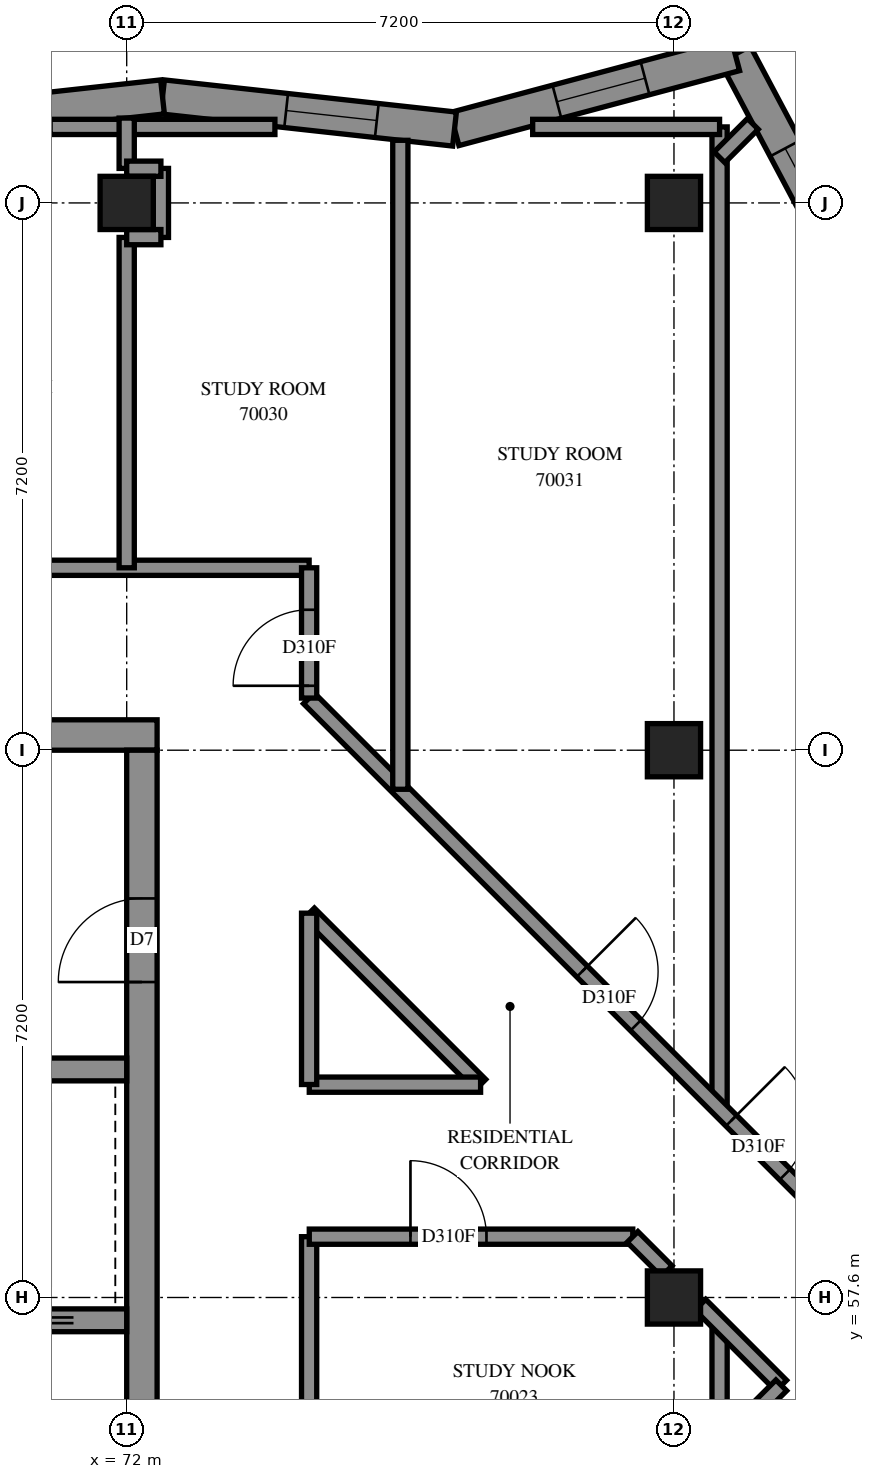
"""IFC4 building model, lengths in metres.
Left out: names, types, materials, properties, quantities, classifications, styles, units other than length and angle.
Written with IfcOpenShell. Run it as: python <this file> out.ifc"""

import sys

from ifc_helpers import new_model, si_unit, direction, frame, frame_2d, origin, origin_2d, place, context, subcontext, project, spatial, polyline, rectangle, outline, extrude, element, fill, save


model = new_model("IFC4")
c1 = context("Model", 3, precision=1e-05, world=origin(), true_north=direction((0.0, 1.0)))
c2 = subcontext(c1, "Body", "Model", "MODEL_VIEW")
j1 = project(units=[si_unit("LENGTHUNIT", "METRE"), si_unit("PLANEANGLEUNIT", "RADIAN")], contexts=[c1])
p1 = place(None, origin())
s1 = spatial("IfcSite", under=j1, at=p1, CompositionType="ELEMENT")
p2 = place(p1, origin())
s2 = spatial("IfcBuilding", under=s1, at=p2, CompositionType="ELEMENT")
p3 = place(p2, frame((0.0, 0.0, 257.4)))
s3 = spatial("IfcBuildingStorey", under=s2, at=p3, CompositionType="ELEMENT", Elevation=257.4)
for number, where, z_axis, x_axis in (
    (1, (72.0, 72.0, 0.0), (0.0, 0.0, 1.0), (1.0, 0.0, 0.0)),
    (2, (79.2, 57.6, 0.0), (0.0, 0.0, 1.0), (1.0, 0.0, 0.0)),
    (3, (79.2, 64.8, 0.0), (0.0, 0.0, 1.0), (1.0, 0.0, 0.0)),
    (4, (79.2, 72.0, 0.0), (0.0, 0.0, 1.0), (1.0, 0.0, 0.0)),
):
    element("IfcColumn", number, at=place(p3, frame(where, z_axis=z_axis, x_axis=x_axis)), inside=s3, PredefinedType="COLUMN", context=c2, shape_type="SweptSolid", body=[
        extrude(rectangle(XDim=0.7, YDim=0.7, at=origin_2d()), origin(), (0.0, 0.0, 1.0), 3.1),
    ])
p4 = place(p3, frame((57.2, 65.0, -0.3), z_axis=(0.0, 0.0, 1.0), x_axis=(1.0, 0.0, 0.0)))
e5 = element("IfcWall", 5, at=p4, inside=s3, PredefinedType="SHEAR", context=c2, shape_type="SweptSolid", body=[
    extrude(rectangle(XDim=15.2, YDim=0.4, at=frame_2d((7.6, 0.0))), origin(), (0.0, 0.0, 1.0), 2.7),
])
p5 = place(p4, frame((10.4, 0.0, 0.3)))
e6 = element("IfcOpeningElement", 6, at=p5, cuts=e5, PredefinedType="OPENING", context=c2, shape_type="SweptSolid", body=[
    extrude(rectangle(XDim=0.8, YDim=2.1, at=frame_2d((0.4, 1.05))), frame((0.0, 0.21, 0.0), z_axis=(0.0, -1.0, 0.0), x_axis=(1.0, 0.0, 0.0)), (0.0, 0.0, 1.0), 0.42),
])
p6 = place(p3, frame((72.2, 50.4, -0.3), z_axis=(0.0, 0.0, 1.0), x_axis=(0.0, 1.0, 0.0)))
e7 = element("IfcWall", 7, at=p6, inside=s3, PredefinedType="SHEAR", context=c2, shape_type="SweptSolid", body=[
    extrude(rectangle(XDim=14.4, YDim=0.4, at=frame_2d((7.2, 0.0))), origin(), (0.0, 0.0, 1.0), 2.7),
])
p7 = place(p6, frame((4.55, 0.0, 0.3)))
e8 = element("IfcOpeningElement", 8, at=p7, cuts=e7, PredefinedType="OPENING", context=c2, shape_type="SweptSolid", body=[
    extrude(rectangle(XDim=1.1, YDim=2.1, at=frame_2d((0.55, 1.05))), frame((0.0, 0.21, 0.0), z_axis=(0.0, -1.0, 0.0), x_axis=(1.0, 0.0, 0.0)), (0.0, 0.0, 1.0), 0.42),
])
p8 = place(p6, frame((11.35, 0.0, 0.3)))
e9 = element("IfcOpeningElement", 9, at=p8, cuts=e7, PredefinedType="OPENING", context=c2, shape_type="SweptSolid", body=[
    extrude(rectangle(XDim=1.1, YDim=2.1, at=frame_2d((0.55, 1.05))), frame((0.0, 0.21, 0.0), z_axis=(0.0, -1.0, 0.0), x_axis=(1.0, 0.0, 0.0)), (0.0, 0.0, 1.0), 0.42),
])
p9 = place(p3, frame((57.6, 57.3, 0.0), z_axis=(0.0, 0.0, 1.0), x_axis=(1.0, 0.0, 0.0)))
e10 = element("IfcWall", 10, at=p9, inside=s3, PredefinedType="SOLIDWALL", context=c2, shape_type="SweptSolid", body=[
    extrude(rectangle(XDim=14.4, YDim=0.3, at=frame_2d((7.2, 0.0))), origin(), (0.0, 0.0, 1.0), 3.1),
])
p10 = place(p9, frame((8.55, 0.0, 0.0)))
e11 = element("IfcOpeningElement", 11, at=p10, cuts=e10, PredefinedType="OPENING", context=c2, shape_type="SweptSolid", body=[
    extrude(rectangle(XDim=0.9, YDim=2.1, at=frame_2d((0.45, 1.05))), frame((0.0, 0.16, 0.0), z_axis=(0.0, -1.0, 0.0), x_axis=(1.0, 0.0, 0.0)), (0.0, 0.0, 1.0), 0.32),
])
p11 = place(p9, frame((1.25, 0.0, 0.0)))
e12 = element("IfcOpeningElement", 12, at=p11, cuts=e10, PredefinedType="OPENING", context=c2, shape_type="SweptSolid", body=[
    extrude(rectangle(XDim=1.1, YDim=2.1, at=frame_2d((0.55, 1.05))), frame((0.0, 0.16, 0.0), z_axis=(0.0, -1.0, 0.0), x_axis=(1.0, 0.0, 0.0)), (0.0, 0.0, 1.0), 0.32),
])
p12 = place(p9, frame((4.85, 0.0, 0.0)))
e13 = element("IfcOpeningElement", 13, at=p12, cuts=e10, PredefinedType="OPENING", context=c2, shape_type="SweptSolid", body=[
    extrude(rectangle(XDim=1.1, YDim=2.1, at=frame_2d((0.55, 1.05))), frame((0.0, 0.16, 0.0), z_axis=(0.0, -1.0, 0.0), x_axis=(1.0, 0.0, 0.0)), (0.0, 0.0, 1.0), 0.32),
])
p13 = place(p9, frame((12.05, 0.0, 0.0)))
e14 = element("IfcOpeningElement", 14, at=p13, cuts=e10, PredefinedType="OPENING", context=c2, shape_type="SweptSolid", body=[
    extrude(rectangle(XDim=1.1, YDim=2.1, at=frame_2d((0.55, 1.05))), frame((0.0, 0.16, 0.0), z_axis=(0.0, -1.0, 0.0), x_axis=(1.0, 0.0, 0.0)), (0.0, 0.0, 1.0), 0.32),
])
p14 = place(p3, frame((64.8, 60.6, 0.0), z_axis=(0.0, 0.0, 1.0), x_axis=(1.0, 0.0, 0.0)))
e15 = element("IfcWall", 15, at=p14, inside=s3, PredefinedType="SOLIDWALL", context=c2, shape_type="SweptSolid", body=[
    extrude(rectangle(XDim=7.2, YDim=0.3, at=frame_2d((3.6, 0.0))), origin(), (0.0, 0.0, 1.0), 3.1),
])
p15 = place(p3, frame((76.513, 49.231, -0.3), z_axis=(0.0, 0.0, 1.0), x_axis=(0.7071067812, 0.7071067812, 0.0)))
e16 = element("IfcWall", 16, at=p15, inside=s3, PredefinedType="SHEAR", context=c2, shape_type="SweptSolid", body=[
    extrude(rectangle(XDim=14.4, YDim=0.4, at=frame_2d((7.2, 0.0))), origin(), (0.0, 0.0, 1.0), 2.7),
])
p16 = place(p15, frame((4.55, 0.0, 0.3)))
e17 = element("IfcOpeningElement", 17, at=p16, cuts=e16, PredefinedType="OPENING", context=c2, shape_type="SweptSolid", body=[
    extrude(rectangle(XDim=1.1, YDim=2.1, at=frame_2d((0.55, 1.05))), frame((0.0, 0.21, 0.0), z_axis=(0.0, -1.0, 0.0), x_axis=(1.0, 0.0, 0.0)), (0.0, 0.0, 1.0), 0.42),
])
p17 = place(p15, frame((11.35, 0.0, 0.3)))
e18 = element("IfcOpeningElement", 18, at=p17, cuts=e16, PredefinedType="OPENING", context=c2, shape_type="SweptSolid", body=[
    extrude(rectangle(XDim=1.1, YDim=2.1, at=frame_2d((0.55, 1.05))), frame((0.0, 0.21, 0.0), z_axis=(0.0, -1.0, 0.0), x_axis=(1.0, 0.0, 0.0)), (0.0, 0.0, 1.0), 0.42),
])
p18 = place(p3, frame((81.578, 70.995, 0.0), z_axis=(0.0, 0.0, 1.0), x_axis=(-0.4689147136, 0.8832434497, 0.0)))
e19 = element("IfcWall", 19, at=p18, inside=s3, PredefinedType="SOLIDWALL", context=c2, shape_type="SweptSolid", body=[
    extrude(outline(polyline([(0.048, -0.225), (3.533, -0.225), (3.175, 0.225), (-0.048, 0.225), (0.048, -0.225)])), origin(), (0.0, 0.0, 1.0), 3.1),
])
p19 = place(p18, frame((0.751, 0.0, 0.45)))
e20 = element("IfcOpeningElement", 20, at=p19, cuts=e19, PredefinedType="OPENING", context=c2, shape_type="SweptSolid", body=[
    extrude(rectangle(XDim=1.2, YDim=2.55, at=frame_2d((0.6, 1.275))), frame((0.0, 0.235, 0.0), z_axis=(0.0, -1.0, 0.0), x_axis=(1.0, 0.0, 0.0)), (0.0, 0.0, 1.0), 0.47),
])
p20 = place(p3, frame((80.005, 73.957, 0.0), z_axis=(0.0, 0.0, 1.0), x_axis=(-0.96615759, -0.257952537, 0.0)))
e21 = element("IfcWall", 21, at=p20, inside=s3, PredefinedType="SOLIDWALL", context=c2, shape_type="SweptSolid", body=[
    extrude(outline(polyline([(-0.179, -0.225), (3.779, -0.225), (3.864, 0.225), (0.179, 0.225), (-0.179, -0.225)])), origin(), (0.0, 0.0, 1.0), 3.1),
])
p21 = place(p20, frame((1.228, 0.0, 0.45)))
e22 = element("IfcOpeningElement", 22, at=p21, cuts=e21, PredefinedType="OPENING", context=c2, shape_type="SweptSolid", body=[
    extrude(rectangle(XDim=1.2, YDim=2.55, at=frame_2d((0.6, 1.275))), frame((0.0, 0.235, 0.0), z_axis=(0.0, -1.0, 0.0), x_axis=(1.0, 0.0, 0.0)), (0.0, 0.0, 1.0), 0.47),
])
p22 = place(p3, frame((76.313, 72.972, 0.0), z_axis=(0.0, 0.0, 1.0), x_axis=(-0.9939952411, 0.1094233099, 0.0)))
e23 = element("IfcWall", 23, at=p22, inside=s3, PredefinedType="SOLIDWALL", context=c2, shape_type="SweptSolid", body=[
    extrude(outline(polyline([(0.042, -0.225), (3.89, -0.225), (3.84, 0.225), (-0.042, 0.225), (0.042, -0.225)])), origin(), (0.0, 0.0, 1.0), 3.1),
])
p23 = place(p22, frame((1.029, 0.0, 0.45)))
e24 = element("IfcOpeningElement", 24, at=p23, cuts=e23, PredefinedType="OPENING", context=c2, shape_type="SweptSolid", body=[
    extrude(rectangle(XDim=1.2, YDim=2.55, at=frame_2d((0.6, 1.275))), frame((0.0, 0.235, 0.0), z_axis=(0.0, -1.0, 0.0), x_axis=(1.0, 0.0, 0.0)), (0.0, 0.0, 1.0), 0.47),
])
p24 = place(p3, frame((72.471, 73.395, 0.0), z_axis=(0.0, 0.0, 1.0), x_axis=(-0.9939954262, -0.1094216281, 0.0)))
e25 = element("IfcWall", 25, at=p24, inside=s3, PredefinedType="SOLIDWALL", context=c2, shape_type="SweptSolid", body=[
    extrude(outline(polyline([(-0.025, -0.225), (3.823, -0.225), (3.872, 0.225), (0.025, 0.225), (-0.025, -0.225)])), origin(), (0.0, 0.0, 1.0), 3.1),
])
p25 = place(p24, frame((1.637, 0.0, 0.7)))
e26 = element("IfcOpeningElement", 26, at=p25, cuts=e25, PredefinedType="OPENING", context=c2, shape_type="SweptSolid", body=[
    extrude(rectangle(XDim=1.8, YDim=2.3, at=frame_2d((0.9, 1.15))), frame((0.0, 0.235, 0.0), z_axis=(0.0, -1.0, 0.0), x_axis=(1.0, 0.0, 0.0)), (0.0, 0.0, 1.0), 0.47),
])
p26 = place(p3, frame((55.2, 67.2, 0.0), z_axis=(0.0, 0.0, 1.0), x_axis=(1.0, 0.0, 0.0)))
e27 = element("IfcWall", 27, at=p26, inside=s3, PredefinedType="PARTITIONING", context=c2, shape_type="SweptSolid", body=[
    extrude(rectangle(XDim=19.2, YDim=0.2, at=frame_2d((9.6, 0.0))), origin(), (0.0, 0.0, 1.0), 3.1),
])
p27 = place(p26, frame((4.475, 0.0, 0.0)))
e28 = element("IfcOpeningElement", 28, at=p27, cuts=e27, PredefinedType="OPENING", context=c2, shape_type="SweptSolid", body=[
    extrude(rectangle(XDim=1.0, YDim=2.1, at=frame_2d((0.5, 1.05))), frame((0.0, 0.11, 0.0), z_axis=(0.0, -1.0, 0.0), x_axis=(1.0, 0.0, 0.0)), (0.0, 0.0, 1.0), 0.22),
])
p28 = place(p26, frame((8.301, 0.0, 0.0)))
e29 = element("IfcOpeningElement", 29, at=p28, cuts=e27, PredefinedType="OPENING", context=c2, shape_type="SweptSolid", body=[
    extrude(rectangle(XDim=0.9, YDim=2.1, at=frame_2d((0.45, 1.05))), frame((0.0, 0.11, 0.0), z_axis=(0.0, -1.0, 0.0), x_axis=(1.0, 0.0, 0.0)), (0.0, 0.0, 1.0), 0.22),
])
p29 = place(p26, frame((13.88, 0.0, 0.0)))
e30 = element("IfcOpeningElement", 30, at=p29, cuts=e27, PredefinedType="OPENING", context=c2, shape_type="SweptSolid", body=[
    extrude(rectangle(XDim=1.0, YDim=2.1, at=frame_2d((0.5, 1.05))), frame((0.0, 0.11, 0.0), z_axis=(0.0, -1.0, 0.0), x_axis=(1.0, 0.0, 0.0)), (0.0, 0.0, 1.0), 0.22),
])
p30 = place(p3, frame((79.8, 60.086, 0.0), z_axis=(0.0, 0.0, 1.0), x_axis=(0.0, 1.0, 0.0)))
e31 = element("IfcWall", 31, at=p30, inside=s3, PredefinedType="PARTITIONING", context=c2, shape_type="SweptSolid", body=[
    extrude(rectangle(XDim=12.914, YDim=0.2, at=frame_2d((6.457, 0.0))), origin(), (0.0, 0.0, 1.0), 3.1),
])
p31 = place(p3, frame((74.397, 65.483, 0.0), z_axis=(0.0, 0.0, 1.0), x_axis=(0.7071067812, -0.7071067812, 0.0)))
e32 = element("IfcWall", 32, at=p31, inside=s3, PredefinedType="PARTITIONING", context=c2, shape_type="SweptSolid", body=[
    extrude(rectangle(XDim=10.788, YDim=0.2, at=frame_2d((5.394, 0.0))), origin(), (0.0, 0.0, 1.0), 3.1),
])
p32 = place(p31, frame((5.083, 0.0, 0.0)))
e33 = element("IfcOpeningElement", 33, at=p32, cuts=e32, PredefinedType="OPENING", context=c2, shape_type="SweptSolid", body=[
    extrude(rectangle(XDim=1.0, YDim=2.1, at=frame_2d((0.5, 1.05))), frame((0.0, 0.11, 0.0), z_axis=(0.0, -1.0, 0.0), x_axis=(1.0, 0.0, 0.0)), (0.0, 0.0, 1.0), 0.22),
])
p33 = place(p31, frame((7.858, 0.0, 0.0)))
e34 = element("IfcOpeningElement", 34, at=p33, cuts=e32, PredefinedType="OPENING", context=c2, shape_type="SweptSolid", body=[
    extrude(rectangle(XDim=1.0, YDim=2.1, at=frame_2d((0.5, 1.05))), frame((0.0, 0.11, 0.0), z_axis=(0.0, -1.0, 0.0), x_axis=(1.0, 0.0, 0.0)), (0.0, 0.0, 1.0), 0.22),
])
p34 = place(p3, frame((75.6, 64.286, 0.0), z_axis=(0.0, 0.0, 1.0), x_axis=(0.0, 1.0, 0.0)))
e35 = element("IfcWall", 35, at=p34, inside=s3, PredefinedType="PARTITIONING", context=c2, shape_type="SweptSolid", body=[
    extrude(rectangle(XDim=8.538, YDim=0.2, at=frame_2d((4.269, 0.0))), origin(), (0.0, 0.0, 1.0), 3.1),
])
p35 = place(p3, frame((74.4, 53.202, 0.0), z_axis=(0.0, 0.0, 1.0), x_axis=(0.0, 1.0, 0.0)))
e36 = element("IfcWall", 36, at=p35, inside=s3, PredefinedType="PARTITIONING", context=c2, shape_type="SweptSolid", body=[
    extrude(rectangle(XDim=5.198, YDim=0.2, at=frame_2d((2.599, 0.0))), origin(), (0.0, 0.0, 1.0), 3.1),
])
p36 = place(p3, frame((72.0, 67.2, 0.0), z_axis=(0.0, 0.0, 1.0), x_axis=(0.0, 1.0, 0.0)))
e37 = element("IfcWall", 37, at=p36, inside=s3, PredefinedType="PARTITIONING", context=c2, shape_type="SweptSolid", body=[
    extrude(rectangle(XDim=4.346, YDim=0.2, at=frame_2d((2.173, 0.0))), origin(), (0.0, 0.0, 1.0), 3.1),
])
p37 = place(p3, frame((74.402, 58.4, 0.0), z_axis=(0.0, 0.0, 1.0), x_axis=(1.0, 0.0, 0.0)))
e38 = element("IfcWall", 38, at=p37, inside=s3, PredefinedType="PARTITIONING", context=c2, shape_type="SweptSolid", body=[
    extrude(rectangle(XDim=4.256, YDim=0.2, at=frame_2d((2.128, 0.0))), origin(), (0.0, 0.0, 1.0), 3.1),
])
p38 = place(p37, frame((1.331, 0.0, 0.0)))
e39 = element("IfcOpeningElement", 39, at=p38, cuts=e38, PredefinedType="OPENING", context=c2, shape_type="SweptSolid", body=[
    extrude(rectangle(XDim=1.0, YDim=2.1, at=frame_2d((0.5, 1.05))), frame((0.0, 0.11, 0.0), z_axis=(0.0, -1.0, 0.0), x_axis=(1.0, 0.0, 0.0)), (0.0, 0.0, 1.0), 0.22),
])
p39 = place(p3, frame((74.399, 62.653, 0.0), z_axis=(0.0, 0.0, 1.0), x_axis=(0.7071067812, -0.7071067812, 0.0)))
e40 = element("IfcWall", 40, at=p39, inside=s3, PredefinedType="PARTITIONING", context=c2, shape_type="SweptSolid", body=[
    extrude(rectangle(XDim=3.188, YDim=0.2, at=frame_2d((1.594, 0.0))), origin(), (0.0, 0.0, 1.0), 3.1),
])
p40 = place(p3, frame((70.993, 73.0, 0.0), z_axis=(0.0, 0.0, 1.0), x_axis=(1.0, 0.0, 0.0)))
e41 = element("IfcWall", 41, at=p40, inside=s3, PredefinedType="PARTITIONING", context=c2, shape_type="SweptSolid", body=[
    extrude(rectangle(XDim=2.957, YDim=0.2, at=frame_2d((1.479, 0.0))), origin(), (0.0, 0.0, 1.0), 3.1),
])
p41 = place(p3, frame((77.341, 73.0, 0.0), z_axis=(0.0, 0.0, 1.0), x_axis=(1.0, 0.0, 0.0)))
e42 = element("IfcWall", 42, at=p41, inside=s3, PredefinedType="PARTITIONING", context=c2, shape_type="SweptSolid", body=[
    extrude(rectangle(XDim=2.459, YDim=0.2, at=frame_2d((1.229, 0.0))), origin(), (0.0, 0.0, 1.0), 3.1),
])
for number, where, z_axis, x_axis in (
    (43, (74.402, 60.4, 0.0), (0.0, 0.0, 1.0), (1.0, 0.0, 0.0)),
    (44, (74.4, 60.402, 0.0), (0.0, 0.0, 1.0), (0.0, 1.0, 0.0)),
):
    element("IfcWall", number, at=place(p3, frame(where, z_axis=z_axis, x_axis=x_axis)), inside=s3, PredefinedType="PARTITIONING", context=c2, shape_type="SweptSolid", body=[
        extrude(rectangle(XDim=2.254, YDim=0.2, at=frame_2d((1.127, 0.0))), origin(), (0.0, 0.0, 1.0), 3.1),
    ])
p42 = place(p3, frame((74.4, 65.486, 0.0), z_axis=(0.0, 0.0, 1.0), x_axis=(0.0, 1.0, 0.0)))
e45 = element("IfcWall", 45, at=p42, inside=s3, PredefinedType="PARTITIONING", context=c2, shape_type="SweptSolid", body=[
    extrude(rectangle(XDim=1.714, YDim=0.2, at=frame_2d((0.857, 0.0))), origin(), (0.0, 0.0, 1.0), 3.1),
])
p43 = place(p42, frame((0.162, 0.0, 0.0)))
e46 = element("IfcOpeningElement", 46, at=p43, cuts=e45, PredefinedType="OPENING", context=c2, shape_type="SweptSolid", body=[
    extrude(rectangle(XDim=1.0, YDim=2.1, at=frame_2d((0.5, 1.05))), frame((0.0, 0.11, 0.0), z_axis=(0.0, -1.0, 0.0), x_axis=(1.0, 0.0, 0.0)), (0.0, 0.0, 1.0), 0.22),
])
p44 = place(p3, frame((79.8, 55.63, 0.0), z_axis=(0.0, 0.0, 1.0), x_axis=(0.0, 1.0, 0.0)))
e47 = element("IfcWall", 47, at=p44, inside=s3, PredefinedType="PARTITIONING", context=c2, shape_type="SweptSolid", body=[
    extrude(rectangle(XDim=1.628, YDim=0.2, at=frame_2d((0.814, 0.0))), origin(), (0.0, 0.0, 1.0), 3.1),
])
p45 = place(p3, frame((79.547, 57.505, 0.0), z_axis=(0.0, 0.0, 1.0), x_axis=(0.7071067812, -0.7071067812, 0.0)))
e48 = element("IfcWall", 48, at=p45, inside=s3, PredefinedType="PARTITIONING", context=c2, shape_type="SweptSolid", body=[
    extrude(rectangle(XDim=1.505, YDim=0.2, at=frame_2d((0.752, 0.0))), origin(), (0.0, 0.0, 1.0), 3.1),
])
p46 = place(p3, frame((79.798, 55.632, 0.0), z_axis=(0.0, 0.0, 1.0), x_axis=(0.7079759957, 0.7062364969, 0.0)))
e49 = element("IfcWall", 49, at=p46, inside=s3, PredefinedType="PARTITIONING", context=c2, shape_type="SweptSolid", body=[
    extrude(rectangle(XDim=1.15, YDim=0.2, at=frame_2d((0.575, 0.0))), origin(), (0.0, 0.0, 1.0), 3.1),
])
p47 = place(p3, frame((72.45, 71.546, 0.0), z_axis=(0.0, 0.0, 1.0), x_axis=(0.0, 1.0, 0.0)))
e50 = element("IfcWall", 50, at=p47, inside=s3, PredefinedType="PARTITIONING", context=c2, shape_type="SweptSolid", body=[
    extrude(rectangle(XDim=0.908, YDim=0.2, at=frame_2d((0.454, 0.0))), origin(), (0.0, 0.0, 1.0), 3.1),
])
p48 = place(p3, frame((78.655, 58.397, 0.0), z_axis=(0.0, 0.0, 1.0), x_axis=(0.7071067812, -0.7071067812, 0.0)))
e51 = element("IfcWall", 51, at=p48, inside=s3, PredefinedType="PARTITIONING", context=c2, shape_type="SweptSolid", body=[
    extrude(rectangle(XDim=0.636, YDim=0.2, at=frame_2d((0.318, 0.0))), origin(), (0.0, 0.0, 1.0), 3.1),
])
p49 = place(p3, frame((72.0, 72.454, 0.0), z_axis=(0.0, 0.0, 1.0), x_axis=(0.0, 1.0, 0.0)))
e52 = element("IfcWall", 52, at=p49, inside=s3, PredefinedType="PARTITIONING", context=c2, shape_type="SweptSolid", body=[
    extrude(rectangle(XDim=0.662, YDim=0.2, at=frame_2d((0.331, 0.0))), origin(), (0.0, 0.0, 1.0), 3.1),
])
p50 = place(p3, frame((79.799, 72.601, 0.0), z_axis=(0.0, 0.0, 1.0), x_axis=(0.7070261763, 0.7071873769, 0.0)))
e53 = element("IfcWall", 53, at=p50, inside=s3, PredefinedType="PARTITIONING", context=c2, shape_type="SweptSolid", body=[
    extrude(rectangle(XDim=0.62, YDim=0.2, at=frame_2d((0.31, 0.0))), origin(), (0.0, 0.0, 1.0), 3.1),
])
for number, where, z_axis, x_axis in (
    (54, (72.0, 72.45, 0.0), (0.0, 0.0, 1.0), (1.0, 0.0, 0.0)),
    (55, (72.0, 71.55, 0.0), (0.0, 0.0, 1.0), (1.0, 0.0, 0.0)),
):
    element("IfcWall", number, at=place(p3, frame(where, z_axis=z_axis, x_axis=x_axis)), inside=s3, PredefinedType="PARTITIONING", context=c2, shape_type="SweptSolid", body=[
        extrude(rectangle(XDim=0.45, YDim=0.2, at=frame_2d((0.225, 0.0))), origin(), (0.0, 0.0, 1.0), 3.1),
    ])
p51 = place(p19, origin())
e56 = element("IfcWindow", 56, at=p51, inside=s3, PartitioningType="SINGLE_PANEL", PredefinedType="WINDOW", context=c2, shape_type="SweptSolid", body=[
    extrude(rectangle(XDim=1.2, YDim=2.55, at=frame_2d((0.6, 1.275))), frame((0.0, 0.205, 0.0), z_axis=(0.0, -1.0, 0.0), x_axis=(1.0, 0.0, 0.0)), (0.0, 0.0, 1.0), 0.06),
])
fill(e20, e56)
p52 = place(p21, origin())
e57 = element("IfcWindow", 57, at=p52, inside=s3, PartitioningType="SINGLE_PANEL", PredefinedType="WINDOW", context=c2, shape_type="SweptSolid", body=[
    extrude(rectangle(XDim=1.2, YDim=2.55, at=frame_2d((0.6, 1.275))), frame((0.0, 0.205, 0.0), z_axis=(0.0, -1.0, 0.0), x_axis=(1.0, 0.0, 0.0)), (0.0, 0.0, 1.0), 0.06),
])
fill(e22, e57)
p53 = place(p23, origin())
e58 = element("IfcWindow", 58, at=p53, inside=s3, PartitioningType="SINGLE_PANEL", PredefinedType="WINDOW", context=c2, shape_type="SweptSolid", body=[
    extrude(rectangle(XDim=1.2, YDim=2.55, at=frame_2d((0.6, 1.275))), frame((0.0, 0.205, 0.0), z_axis=(0.0, -1.0, 0.0), x_axis=(1.0, 0.0, 0.0)), (0.0, 0.0, 1.0), 0.06),
])
fill(e24, e58)
p54 = place(p8, origin())
e59 = element("IfcDoor", 59, at=p54, inside=s3, OperationType="SINGLE_SWING_RIGHT", PredefinedType="DOOR", context=c2, shape_type="SweptSolid", body=[
    extrude(rectangle(XDim=1.1, YDim=2.1, at=frame_2d((0.55, 1.05))), frame((0.0, 0.025, 0.0), z_axis=(0.0, -1.0, 0.0), x_axis=(1.0, 0.0, 0.0)), (0.0, 0.0, 1.0), 0.05),
])
fill(e9, e59)
p55 = place(p38, origin())
e60 = element("IfcDoor", 60, at=p55, inside=s3, OperationType="SINGLE_SWING_RIGHT", PredefinedType="DOOR", context=c2, shape_type="SweptSolid", body=[
    extrude(rectangle(XDim=1.0, YDim=2.1, at=frame_2d((0.5, 1.05))), frame((0.0, 0.025, 0.0), z_axis=(0.0, -1.0, 0.0), x_axis=(1.0, 0.0, 0.0)), (0.0, 0.0, 1.0), 0.05),
])
fill(e39, e60)
p56 = place(p43, origin())
e61 = element("IfcDoor", 61, at=p56, inside=s3, OperationType="SINGLE_SWING_RIGHT", PredefinedType="DOOR", context=c2, shape_type="SweptSolid", body=[
    extrude(rectangle(XDim=1.0, YDim=2.1, at=frame_2d((0.5, 1.05))), frame((0.0, 0.025, 0.0), z_axis=(0.0, -1.0, 0.0), x_axis=(1.0, 0.0, 0.0)), (0.0, 0.0, 1.0), 0.05),
])
fill(e46, e61)
p57 = place(p32, origin())
e62 = element("IfcDoor", 62, at=p57, inside=s3, OperationType="SINGLE_SWING_LEFT", PredefinedType="DOOR", context=c2, shape_type="SweptSolid", body=[
    extrude(rectangle(XDim=1.0, YDim=2.1, at=frame_2d((0.5, 1.05))), frame((0.0, 0.025, 0.0), z_axis=(0.0, -1.0, 0.0), x_axis=(1.0, 0.0, 0.0)), (0.0, 0.0, 1.0), 0.05),
])
fill(e33, e62)
p58 = place(p33, origin())
e63 = element("IfcDoor", 63, at=p58, inside=s3, OperationType="SINGLE_SWING_LEFT", PredefinedType="DOOR", context=c2, shape_type="SweptSolid", body=[
    extrude(rectangle(XDim=1.0, YDim=2.1, at=frame_2d((0.5, 1.05))), frame((0.0, 0.025, 0.0), z_axis=(0.0, -1.0, 0.0), x_axis=(1.0, 0.0, 0.0)), (0.0, 0.0, 1.0), 0.05),
])
fill(e34, e63)
save(model, sys.argv[1])
